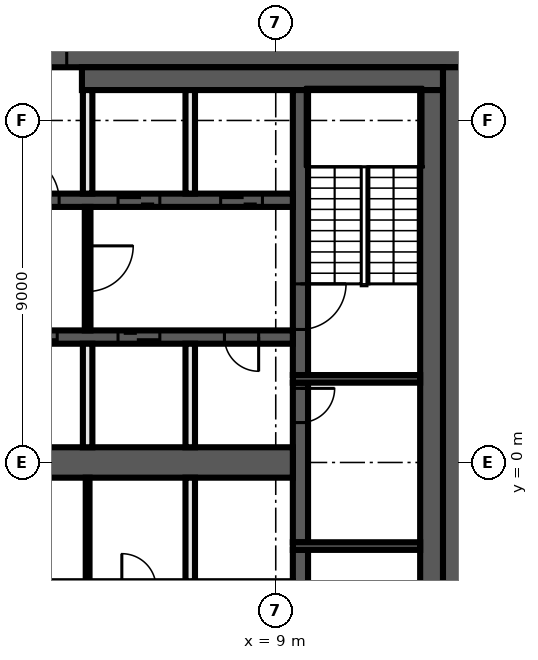
"""IFC4 building model, lengths in metres.
Left out: names, types, materials, properties, quantities, classifications, styles, units other than length and angle.
Written with IfcOpenShell. Run it as: python <this file> out.ifc"""

import sys

from ifc_helpers import new_model, si_unit, direction, frame, frame_2d, origin, place, context, subcontext, project, spatial, rectangle, extrude, element, fill, save


model = new_model("IFC4")
c1 = context("Model", 3, precision=1e-05, world=origin(), true_north=direction((0.0, 1.0)))
c2 = subcontext(c1, "Body", "Model", "MODEL_VIEW")
j1 = project(units=[si_unit("LENGTHUNIT", "METRE"), si_unit("PLANEANGLEUNIT", "RADIAN")], contexts=[c1])
p1 = place(None, origin())
s1 = spatial("IfcSite", under=j1, at=p1, CompositionType="ELEMENT")
p2 = place(p1, origin())
s2 = spatial("IfcBuilding", under=s1, at=p2, CompositionType="ELEMENT")
p3 = place(p2, frame((0.0, 0.0, 344.6)))
s3 = spatial("IfcBuildingStorey", under=s2, at=p3, CompositionType="ELEMENT", Elevation=344.6)
p4 = place(p3, frame((-14.0, 10.7, 0.0), z_axis=(0.0, 0.0, 1.0), x_axis=(1.0, 0.0, 0.0)))
e1 = element("IfcWall", 1, at=p4, inside=s3, PredefinedType="SHEAR", context=c2, shape_type="SweptSolid", body=[
    extrude(rectangle(XDim=28.0, YDim=0.6, at=frame_2d((14.0, 0.0))), origin(), (0.0, 0.0, 1.0), 3.82),
])
p5 = place(p4, frame((15.9, 0.0, 0.0)))
e2 = element("IfcOpeningElement", 2, at=p5, cuts=e1, PredefinedType="OPENING", context=c2, shape_type="SweptSolid", body=[
    extrude(rectangle(XDim=1.6, YDim=2.1, at=frame_2d((0.8, 1.05))), frame((0.0, 0.31, 0.0), z_axis=(0.0, -1.0, 0.0), x_axis=(1.0, 0.0, 0.0)), (0.0, 0.0, 1.0), 0.62),
])
p6 = place(p3, frame((13.7, 10.4, 0.0), z_axis=(0.0, 0.0, 1.0), x_axis=(0.0, -1.0, 0.0)))
e3 = element("IfcWall", 3, at=p6, inside=s3, PredefinedType="SHEAR", context=c2, shape_type="SweptSolid", body=[
    extrude(rectangle(XDim=20.8, YDim=0.6, at=frame_2d((10.4, 0.0))), origin(), (0.0, 0.0, 1.0), 3.82),
])
p7 = place(p3, frame((3.9, 10.1, 0.0), z_axis=(0.0, 0.0, 1.0), x_axis=(1.0, 0.0, 0.0)))
e4 = element("IfcWall", 4, at=p7, inside=s3, PredefinedType="SHEAR", context=c2, shape_type="SweptSolid", body=[
    extrude(rectangle(XDim=9.5, YDim=0.6, at=frame_2d((4.75, 0.0))), origin(), (0.0, 0.0, 1.0), 3.82),
])
p8 = place(p3, frame((13.1, 9.8, 0.0), z_axis=(0.0, 0.0, 1.0), x_axis=(0.0, -1.0, 0.0)))
e5 = element("IfcWall", 5, at=p8, inside=s3, PredefinedType="SHEAR", context=c2, shape_type="SweptSolid", body=[
    extrude(rectangle(XDim=19.6, YDim=0.6, at=frame_2d((9.8, 0.0))), origin(), (0.0, 0.0, 1.0), 3.82),
])
p9 = place(p3, frame((9.65, -2.3, 0.0), z_axis=(0.0, 0.0, 1.0), x_axis=(0.0, -1.0, 0.0)))
e6 = element("IfcWall", 6, at=p9, inside=s3, PredefinedType="SHEAR", context=c2, shape_type="SweptSolid", body=[
    extrude(rectangle(XDim=7.5, YDim=0.4, at=frame_2d((3.75, 0.0))), origin(), (0.0, 0.0, 1.0), 3.82),
])
p10 = place(p9, frame((1.2, 0.0, 0.0)))
e7 = element("IfcOpeningElement", 7, at=p10, cuts=e6, PredefinedType="OPENING", context=c2, shape_type="SweptSolid", body=[
    extrude(rectangle(XDim=1.2, YDim=2.1, at=frame_2d((0.6, 1.05))), frame((0.0, 0.21, 0.0), z_axis=(0.0, -1.0, 0.0), x_axis=(1.0, 0.0, 0.0)), (0.0, 0.0, 1.0), 0.42),
])
p11 = place(p3, frame((9.65, 2.1, 0.0), z_axis=(0.0, 0.0, 1.0), x_axis=(0.0, -1.0, 0.0)))
e8 = element("IfcWall", 8, at=p11, inside=s3, PredefinedType="SHEAR", context=c2, shape_type="SweptSolid", body=[
    extrude(rectangle(XDim=4.2, YDim=0.4, at=frame_2d((2.1, 0.0))), origin(), (0.0, 0.0, 1.0), 3.82),
])
p12 = place(p11, frame((0.15, 0.0, 0.0)))
e9 = element("IfcOpeningElement", 9, at=p12, cuts=e8, PredefinedType="OPENING", context=c2, shape_type="SweptSolid", body=[
    extrude(rectangle(XDim=0.9, YDim=2.1, at=frame_2d((0.45, 1.05))), frame((0.0, 0.21, 0.0), z_axis=(0.0, -1.0, 0.0), x_axis=(1.0, 0.0, 0.0)), (0.0, 0.0, 1.0), 0.42),
])
p13 = place(p3, frame((9.65, 9.8, 0.0), z_axis=(0.0, 0.0, 1.0), x_axis=(0.0, -1.0, 0.0)))
e10 = element("IfcWall", 10, at=p13, inside=s3, PredefinedType="SHEAR", context=c2, shape_type="SweptSolid", body=[
    extrude(rectangle(XDim=7.5, YDim=0.4, at=frame_2d((3.75, 0.0))), origin(), (0.0, 0.0, 1.0), 3.82),
])
p14 = place(p13, frame((5.1, 0.0, 0.0)))
e11 = element("IfcOpeningElement", 11, at=p14, cuts=e10, PredefinedType="OPENING", context=c2, shape_type="SweptSolid", body=[
    extrude(rectangle(XDim=1.2, YDim=2.1, at=frame_2d((0.6, 1.05))), frame((0.0, 0.21, 0.0), z_axis=(0.0, -1.0, 0.0), x_axis=(1.0, 0.0, 0.0)), (0.0, 0.0, 1.0), 0.42),
])
for number, where, z_axis, x_axis in (
    (12, (9.45, 2.2, 0.0), (0.0, 0.0, 1.0), (1.0, 0.0, 0.0)),
    (13, (9.45, -2.2, 0.0), (0.0, 0.0, 1.0), (1.0, 0.0, 0.0)),
):
    element("IfcWall", number, at=place(p3, frame(where, z_axis=z_axis, x_axis=x_axis)), inside=s3, PredefinedType="SHEAR", context=c2, shape_type="SweptSolid", body=[
        extrude(rectangle(XDim=3.35, YDim=0.2, at=frame_2d((1.675, 0.0))), origin(), (0.0, 0.0, 1.0), 3.82),
    ])
p15 = place(p3, frame((-9.45, 6.9, 0.0), z_axis=(0.0, 0.0, 1.0), x_axis=(1.0, 0.0, 0.0)))
e14 = element("IfcWall", 14, at=p15, inside=s3, PredefinedType="SHEAR", context=c2, shape_type="SweptSolid", body=[
    extrude(rectangle(XDim=18.9, YDim=0.35, at=frame_2d((9.45, 0.0))), origin(), (0.0, 0.0, 1.0), 3.82),
])
p16 = place(p15, frame((11.55, 0.0, 0.0)))
e15 = element("IfcOpeningElement", 15, at=p16, cuts=e14, PredefinedType="OPENING", context=c2, shape_type="SweptSolid", body=[
    extrude(rectangle(XDim=1.2, YDim=2.1, at=frame_2d((0.6, 1.05))), frame((0.0, 0.185, 0.0), z_axis=(0.0, -1.0, 0.0), x_axis=(1.0, 0.0, 0.0)), (0.0, 0.0, 1.0), 0.37),
])
p17 = place(p15, frame((14.3, 0.0, 0.0)))
e16 = element("IfcOpeningElement", 16, at=p17, cuts=e14, PredefinedType="OPENING", context=c2, shape_type="SweptSolid", body=[
    extrude(rectangle(XDim=1.1, YDim=2.1, at=frame_2d((0.55, 1.05))), frame((0.0, 0.185, 0.0), z_axis=(0.0, -1.0, 0.0), x_axis=(1.0, 0.0, 0.0)), (0.0, 0.0, 1.0), 0.37),
])
p18 = place(p15, frame((17.0, 0.0, 0.0)))
e17 = element("IfcOpeningElement", 17, at=p18, cuts=e14, PredefinedType="OPENING", context=c2, shape_type="SweptSolid", body=[
    extrude(rectangle(XDim=1.1, YDim=2.1, at=frame_2d((0.55, 1.05))), frame((0.0, 0.185, 0.0), z_axis=(0.0, -1.0, 0.0), x_axis=(1.0, 0.0, 0.0)), (0.0, 0.0, 1.0), 0.37),
])
p19 = place(p15, frame((0.9, 0.0, 0.0)))
e18 = element("IfcOpeningElement", 18, at=p19, cuts=e14, PredefinedType="OPENING", context=c2, shape_type="SweptSolid", body=[
    extrude(rectangle(XDim=0.9, YDim=2.1, at=frame_2d((0.45, 1.05))), frame((0.0, 0.185, 0.0), z_axis=(0.0, -1.0, 0.0), x_axis=(1.0, 0.0, 0.0)), (0.0, 0.0, 1.0), 0.37),
])
p20 = place(p15, frame((4.95, 0.0, 0.0)))
e19 = element("IfcOpeningElement", 19, at=p20, cuts=e14, PredefinedType="OPENING", context=c2, shape_type="SweptSolid", body=[
    extrude(rectangle(XDim=0.9, YDim=2.1, at=frame_2d((0.45, 1.05))), frame((0.0, 0.185, 0.0), z_axis=(0.0, -1.0, 0.0), x_axis=(1.0, 0.0, 0.0)), (0.0, 0.0, 1.0), 0.37),
])
p21 = place(p15, frame((9.0, 0.0, 0.0)))
e20 = element("IfcOpeningElement", 20, at=p21, cuts=e14, PredefinedType="OPENING", context=c2, shape_type="SweptSolid", body=[
    extrude(rectangle(XDim=0.9, YDim=2.1, at=frame_2d((0.45, 1.05))), frame((0.0, 0.185, 0.0), z_axis=(0.0, -1.0, 0.0), x_axis=(1.0, 0.0, 0.0)), (0.0, 0.0, 1.0), 0.37),
])
p22 = place(p3, frame((9.45, 3.3, 0.0), z_axis=(0.0, 0.0, 1.0), x_axis=(-1.0, 0.0, 0.0)))
e21 = element("IfcWall", 21, at=p22, inside=s3, PredefinedType="SHEAR", context=c2, shape_type="SweptSolid", body=[
    extrude(rectangle(XDim=18.9, YDim=0.35, at=frame_2d((9.45, 0.0))), origin(), (0.0, 0.0, 1.0), 3.82),
])
p23 = place(p22, frame((6.2, 0.0, 0.0)))
e22 = element("IfcOpeningElement", 22, at=p23, cuts=e21, PredefinedType="OPENING", context=c2, shape_type="SweptSolid", body=[
    extrude(rectangle(XDim=1.1, YDim=2.1, at=frame_2d((0.55, 1.05))), frame((0.0, 0.185, 0.0), z_axis=(0.0, -1.0, 0.0), x_axis=(1.0, 0.0, 0.0)), (0.0, 0.0, 1.0), 0.37),
])
p24 = place(p22, frame((3.5, 0.0, 0.0)))
e23 = element("IfcOpeningElement", 23, at=p24, cuts=e21, PredefinedType="OPENING", context=c2, shape_type="SweptSolid", body=[
    extrude(rectangle(XDim=1.1, YDim=2.1, at=frame_2d((0.55, 1.05))), frame((0.0, 0.185, 0.0), z_axis=(0.0, -1.0, 0.0), x_axis=(1.0, 0.0, 0.0)), (0.0, 0.0, 1.0), 0.37),
])
p25 = place(p22, frame((0.9, 0.0, 0.0)))
e24 = element("IfcOpeningElement", 24, at=p25, cuts=e21, PredefinedType="OPENING", context=c2, shape_type="SweptSolid", body=[
    extrude(rectangle(XDim=0.9, YDim=2.1, at=frame_2d((0.45, 1.05))), frame((0.0, 0.185, 0.0), z_axis=(0.0, -1.0, 0.0), x_axis=(1.0, 0.0, 0.0)), (0.0, 0.0, 1.0), 0.37),
])
p26 = place(p22, frame((15.75, 0.0, 0.0)))
e25 = element("IfcOpeningElement", 25, at=p26, cuts=e21, PredefinedType="OPENING", context=c2, shape_type="SweptSolid", body=[
    extrude(rectangle(XDim=0.9, YDim=2.1, at=frame_2d((0.45, 1.05))), frame((0.0, 0.185, 0.0), z_axis=(0.0, -1.0, 0.0), x_axis=(1.0, 0.0, 0.0)), (0.0, 0.0, 1.0), 0.37),
])
p27 = place(p22, frame((10.35, 0.0, 0.0)))
e26 = element("IfcOpeningElement", 26, at=p27, cuts=e21, PredefinedType="OPENING", context=c2, shape_type="SweptSolid", body=[
    extrude(rectangle(XDim=0.9, YDim=2.1, at=frame_2d((0.45, 1.05))), frame((0.0, 0.185, 0.0), z_axis=(0.0, -1.0, 0.0), x_axis=(1.0, 0.0, 0.0)), (0.0, 0.0, 1.0), 0.37),
])
p28 = place(p3, frame((-9.45, 0.0, 0.0), z_axis=(0.0, 0.0, 1.0), x_axis=(1.0, 0.0, 0.0)))
e27 = element("IfcWall", 27, at=p28, inside=s3, PredefinedType="SHEAR", context=c2, shape_type="SweptSolid", body=[
    extrude(rectangle(XDim=18.9, YDim=0.8, at=frame_2d((9.45, 0.0))), origin(), (0.0, 0.0, 1.0), 3.82),
])
for number, where, z_axis, x_axis in (
    (28, (6.75, -3.125, 0.0), (0.0, 0.0, 1.0), (0.0, 1.0, 0.0)),
    (29, (6.75, 0.4, 0.0), (0.0, 0.0, 1.0), (0.0, 1.0, 0.0)),
    (30, (6.75, 7.075, 0.0), (0.0, 0.0, 1.0), (0.0, 1.0, 0.0)),
):
    element("IfcWall", number, at=place(p3, frame(where, z_axis=z_axis, x_axis=x_axis)), inside=s3, PredefinedType="SOLIDWALL", context=c2, shape_type="SweptSolid", body=[
        extrude(rectangle(XDim=2.725, YDim=0.25, at=frame_2d((1.363, 0.0))), origin(), (0.0, 0.0, 1.0), 3.82),
    ])
p29 = place(p3, frame((4.05, 6.725, 0.0), z_axis=(0.0, 0.0, 1.0), x_axis=(0.0, -1.0, 0.0)))
e31 = element("IfcWall", 31, at=p29, inside=s3, PredefinedType="PARTITIONING", context=c2, shape_type="SweptSolid", body=[
    extrude(rectangle(XDim=3.25, YDim=0.15, at=frame_2d((1.625, 0.0))), origin(), (0.0, 0.0, 1.0), 3.82),
])
p30 = place(p29, frame((1.025, 0.0, 0.0)))
e32 = element("IfcOpeningElement", 32, at=p30, cuts=e31, PredefinedType="OPENING", context=c2, shape_type="SweptSolid", body=[
    extrude(rectangle(XDim=1.2, YDim=2.1, at=frame_2d((0.6, 1.05))), frame((0.0, 0.085, 0.0), z_axis=(0.0, -1.0, 0.0), x_axis=(1.0, 0.0, 0.0)), (0.0, 0.0, 1.0), 0.17),
])
p31 = place(p3, frame((4.05, -3.125, 0.0), z_axis=(0.0, 0.0, 1.0), x_axis=(0.0, 1.0, 0.0)))
e33 = element("IfcWall", 33, at=p31, inside=s3, PredefinedType="PARTITIONING", context=c2, shape_type="SweptSolid", body=[
    extrude(rectangle(XDim=2.725, YDim=0.1, at=frame_2d((1.363, 0.0))), origin(), (0.0, 0.0, 1.0), 3.82),
])
for number, where, z_axis, x_axis in (
    (34, (4.05, 0.4, 0.0), (0.0, 0.0, 1.0), (0.0, 1.0, 0.0)),
    (35, (4.05, 7.075, 0.0), (0.0, 0.0, 1.0), (0.0, 1.0, 0.0)),
):
    element("IfcWall", number, at=place(p3, frame(where, z_axis=z_axis, x_axis=x_axis)), inside=s3, PredefinedType="SOLIDWALL", context=c2, shape_type="SweptSolid", body=[
        extrude(rectangle(XDim=2.725, YDim=0.25, at=frame_2d((1.363, 0.0))), origin(), (0.0, 0.0, 1.0), 3.82),
    ])
p32 = place(p12, origin())
e36 = element("IfcDoor", 36, at=p32, inside=s3, OperationType="SINGLE_SWING_RIGHT", PredefinedType="DOOR", context=c2, shape_type="SweptSolid", body=[
    extrude(rectangle(XDim=0.9, YDim=2.1, at=frame_2d((0.45, 1.05))), frame((0.0, 0.025, 0.0), z_axis=(0.0, -1.0, 0.0), x_axis=(1.0, 0.0, 0.0)), (0.0, 0.0, 1.0), 0.05),
])
fill(e9, e36)
p33 = place(p5, origin())
e37 = element("IfcDoor", 37, at=p33, inside=s3, OperationType="DOUBLE_DOOR_SINGLE_SWING", PredefinedType="DOOR", context=c2, shape_type="SweptSolid", body=[
    extrude(rectangle(XDim=1.6, YDim=2.1, at=frame_2d((0.8, 1.05))), frame((0.0, 0.025, 0.0), z_axis=(0.0, -1.0, 0.0), x_axis=(1.0, 0.0, 0.0)), (0.0, 0.0, 1.0), 0.05),
])
fill(e2, e37)
p34 = place(p16, origin())
e38 = element("IfcDoor", 38, at=p34, inside=s3, OperationType="SINGLE_SWING_LEFT", PredefinedType="DOOR", context=c2, shape_type="SweptSolid", body=[
    extrude(rectangle(XDim=1.2, YDim=2.1, at=frame_2d((0.6, 1.05))), frame((0.0, 0.025, 0.0), z_axis=(0.0, -1.0, 0.0), x_axis=(1.0, 0.0, 0.0)), (0.0, 0.0, 1.0), 0.05),
])
fill(e15, e38)
p35 = place(p17, origin())
e39 = element("IfcDoor", 39, at=p35, inside=s3, OperationType="DOUBLE_DOOR_SLIDING", PredefinedType="DOOR", context=c2, shape_type="SweptSolid", body=[
    extrude(rectangle(XDim=1.1, YDim=2.1, at=frame_2d((0.55, 1.05))), frame((0.0, 0.025, 0.0), z_axis=(0.0, -1.0, 0.0), x_axis=(1.0, 0.0, 0.0)), (0.0, 0.0, 1.0), 0.05),
])
fill(e16, e39)
p36 = place(p18, origin())
e40 = element("IfcDoor", 40, at=p36, inside=s3, OperationType="DOUBLE_DOOR_SLIDING", PredefinedType="DOOR", context=c2, shape_type="SweptSolid", body=[
    extrude(rectangle(XDim=1.1, YDim=2.1, at=frame_2d((0.55, 1.05))), frame((0.0, 0.025, 0.0), z_axis=(0.0, -1.0, 0.0), x_axis=(1.0, 0.0, 0.0)), (0.0, 0.0, 1.0), 0.05),
])
fill(e17, e40)
p37 = place(p23, origin())
e41 = element("IfcDoor", 41, at=p37, inside=s3, OperationType="DOUBLE_DOOR_SLIDING", PredefinedType="DOOR", context=c2, shape_type="SweptSolid", body=[
    extrude(rectangle(XDim=1.1, YDim=2.1, at=frame_2d((0.55, 1.05))), frame((0.0, 0.025, 0.0), z_axis=(0.0, -1.0, 0.0), x_axis=(1.0, 0.0, 0.0)), (0.0, 0.0, 1.0), 0.05),
])
fill(e22, e41)
p38 = place(p24, origin())
e42 = element("IfcDoor", 42, at=p38, inside=s3, OperationType="DOUBLE_DOOR_SLIDING", PredefinedType="DOOR", context=c2, shape_type="SweptSolid", body=[
    extrude(rectangle(XDim=1.1, YDim=2.1, at=frame_2d((0.55, 1.05))), frame((0.0, 0.025, 0.0), z_axis=(0.0, -1.0, 0.0), x_axis=(1.0, 0.0, 0.0)), (0.0, 0.0, 1.0), 0.05),
])
fill(e23, e42)
p39 = place(p25, origin())
e43 = element("IfcDoor", 43, at=p39, inside=s3, OperationType="SINGLE_SWING_LEFT", PredefinedType="DOOR", context=c2, shape_type="SweptSolid", body=[
    extrude(rectangle(XDim=0.9, YDim=2.1, at=frame_2d((0.45, 1.05))), frame((0.0, 0.025, 0.0), z_axis=(0.0, -1.0, 0.0), x_axis=(1.0, 0.0, 0.0)), (0.0, 0.0, 1.0), 0.05),
])
fill(e24, e43)
p40 = place(p14, origin())
e44 = element("IfcDoor", 44, at=p40, inside=s3, OperationType="SINGLE_SWING_LEFT", PredefinedType="DOOR", context=c2, shape_type="SweptSolid", body=[
    extrude(rectangle(XDim=1.2, YDim=2.1, at=frame_2d((0.6, 1.05))), frame((0.0, 0.025, 0.0), z_axis=(0.0, -1.0, 0.0), x_axis=(1.0, 0.0, 0.0)), (0.0, 0.0, 1.0), 0.05),
])
fill(e11, e44)
p41 = place(p30, origin())
e45 = element("IfcDoor", 45, at=p41, inside=s3, OperationType="SINGLE_SWING_RIGHT", PredefinedType="DOOR", context=c2, shape_type="SweptSolid", body=[
    extrude(rectangle(XDim=1.2, YDim=2.1, at=frame_2d((0.6, 1.05))), frame((0.0, 0.025, 0.0), z_axis=(0.0, -1.0, 0.0), x_axis=(1.0, 0.0, 0.0)), (0.0, 0.0, 1.0), 0.05),
])
fill(e32, e45)
save(model, sys.argv[1])
